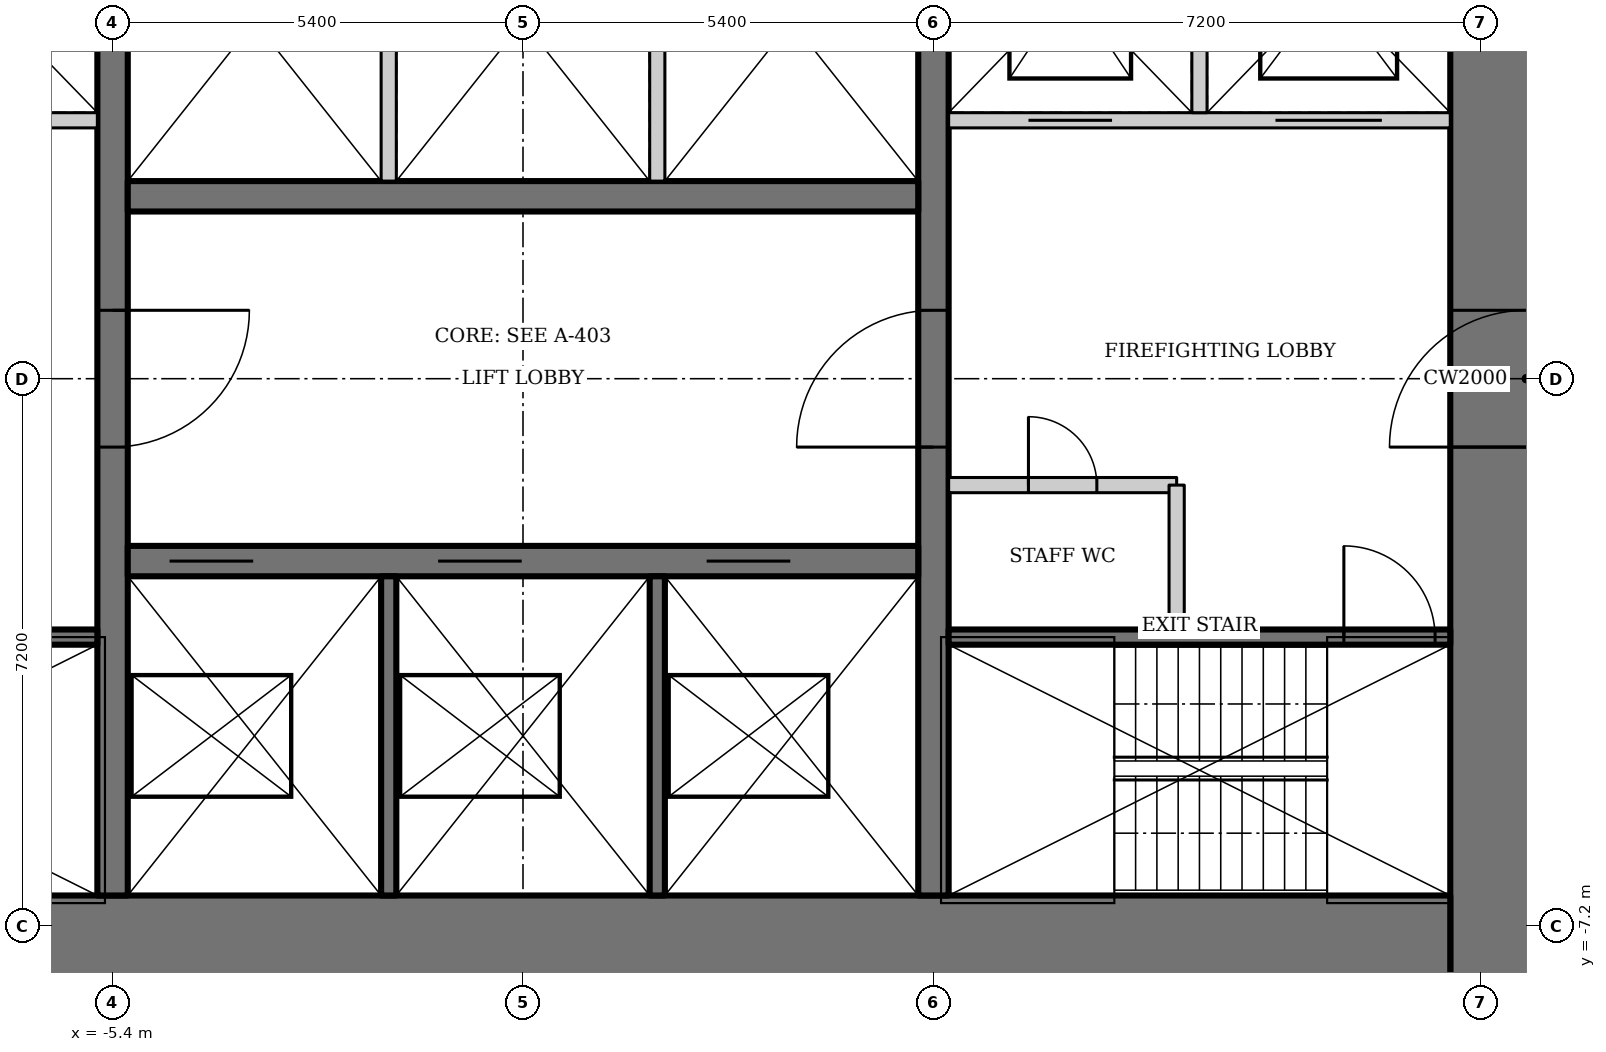
"""IFC4 building model, lengths in metres.
Left out: names, types, materials, properties, quantities, classifications, styles, units other than length and angle.
Written with IfcOpenShell. Run it as: python <this file> out.ifc"""

import sys

from ifc_helpers import new_model, si_unit, direction, frame, frame_2d, origin, place, context, subcontext, project, spatial, rectangle, extrude, element, fill, save


model = new_model("IFC4")
c1 = context("Model", 3, precision=1e-05, world=origin(), true_north=direction((0.0, 1.0)))
c2 = subcontext(c1, "Body", "Model", "MODEL_VIEW")
j1 = project(units=[si_unit("LENGTHUNIT", "METRE"), si_unit("PLANEANGLEUNIT", "RADIAN")], contexts=[c1])
p1 = place(None, origin())
s1 = spatial("IfcSite", under=j1, at=p1, CompositionType="ELEMENT")
p2 = place(p1, origin())
s2 = spatial("IfcBuilding", under=s1, at=p2, CompositionType="ELEMENT")
p3 = place(p2, frame((0.0, 0.0, 91.0)))
s3 = spatial("IfcBuildingStorey", under=s2, at=p3, CompositionType="ELEMENT", Elevation=91.0)
p4 = place(p3, frame((13.2, -13.0, 0.0), z_axis=(0.0, 0.0, 1.0), x_axis=(0.0, 1.0, 0.0)))
e1 = element("IfcWall", 1, at=p4, inside=s3, PredefinedType="SHEAR", context=c2, shape_type="SweptSolid", body=[
    extrude(rectangle(XDim=26.0, YDim=2.0, at=frame_2d((13.0, 0.0))), origin(), (0.0, 0.0, 1.0), 3.6),
])
p5 = place(p4, frame((12.1, 0.0, 0.0)))
e2 = element("IfcOpeningElement", 2, at=p5, cuts=e1, PredefinedType="OPENING", context=c2, shape_type="SweptSolid", body=[
    extrude(rectangle(XDim=1.8, YDim=2.1, at=frame_2d((0.9, 1.05))), frame((0.0, 1.01, 0.0), z_axis=(0.0, -1.0, 0.0), x_axis=(1.0, 0.0, 0.0)), (0.0, 0.0, 1.0), 2.02),
])
p6 = place(p3, frame((-12.2, -8.0, 0.0), z_axis=(0.0, 0.0, 1.0), x_axis=(1.0, 0.0, 0.0)))
e3 = element("IfcWall", 3, at=p6, inside=s3, PredefinedType="SHEAR", context=c2, shape_type="SweptSolid", body=[
    extrude(rectangle(XDim=24.4, YDim=2.4, at=frame_2d((12.2, 0.0))), origin(), (0.0, 0.0, 1.0), 3.6),
])
p7 = place(p3, frame((5.4, -6.8, 0.0), z_axis=(0.0, 0.0, 1.0), x_axis=(0.0, 1.0, 0.0)))
e4 = element("IfcWall", 4, at=p7, inside=s3, PredefinedType="SHEAR", context=c2, shape_type="SweptSolid", body=[
    extrude(rectangle(XDim=13.6, YDim=0.4, at=frame_2d((6.8, 0.0))), origin(), (0.0, 0.0, 1.0), 3.6),
])
p8 = place(p7, frame((5.9, 0.0, 0.0)))
e5 = element("IfcOpeningElement", 5, at=p8, cuts=e4, PredefinedType="OPENING", context=c2, shape_type="SweptSolid", body=[
    extrude(rectangle(XDim=1.8, YDim=2.1, at=frame_2d((0.9, 1.05))), frame((0.0, 0.21, 0.0), z_axis=(0.0, -1.0, 0.0), x_axis=(1.0, 0.0, 0.0)), (0.0, 0.0, 1.0), 0.42),
])
p9 = place(p3, frame((-5.4, 6.8, 0.0), z_axis=(0.0, 0.0, 1.0), x_axis=(0.0, -1.0, 0.0)))
e6 = element("IfcWall", 6, at=p9, inside=s3, PredefinedType="SHEAR", context=c2, shape_type="SweptSolid", body=[
    extrude(rectangle(XDim=13.6, YDim=0.4, at=frame_2d((6.8, 0.0))), origin(), (0.0, 0.0, 1.0), 3.6),
])
p10 = place(p9, frame((5.9, 0.0, 0.0)))
e7 = element("IfcOpeningElement", 7, at=p10, cuts=e6, PredefinedType="OPENING", context=c2, shape_type="SweptSolid", body=[
    extrude(rectangle(XDim=1.8, YDim=2.1, at=frame_2d((0.9, 1.05))), frame((0.0, 0.21, 0.0), z_axis=(0.0, -1.0, 0.0), x_axis=(1.0, 0.0, 0.0)), (0.0, 0.0, 1.0), 0.42),
])
p11 = place(p3, frame((-5.2, -2.4, 0.0), z_axis=(0.0, 0.0, 1.0), x_axis=(1.0, 0.0, 0.0)))
e8 = element("IfcWall", 8, at=p11, inside=s3, PredefinedType="SHEAR", context=c2, shape_type="SweptSolid", body=[
    extrude(rectangle(XDim=10.4, YDim=0.4, at=frame_2d((5.2, 0.0))), origin(), (0.0, 0.0, 1.0), 3.6),
])
p12 = place(p11, frame((0.55, 0.0, 0.0)))
e9 = element("IfcOpeningElement", 9, at=p12, cuts=e8, PredefinedType="OPENING", context=c2, shape_type="SweptSolid", body=[
    extrude(rectangle(XDim=1.1, YDim=2.2, at=frame_2d((0.55, 1.1))), frame((0.0, 0.21, 0.0), z_axis=(0.0, -1.0, 0.0), x_axis=(1.0, 0.0, 0.0)), (0.0, 0.0, 1.0), 0.42),
])
p13 = place(p11, frame((4.083, 0.0, 0.0)))
e10 = element("IfcOpeningElement", 10, at=p13, cuts=e8, PredefinedType="OPENING", context=c2, shape_type="SweptSolid", body=[
    extrude(rectangle(XDim=1.1, YDim=2.2, at=frame_2d((0.55, 1.1))), frame((0.0, 0.21, 0.0), z_axis=(0.0, -1.0, 0.0), x_axis=(1.0, 0.0, 0.0)), (0.0, 0.0, 1.0), 0.42),
])
p14 = place(p11, frame((7.617, 0.0, 0.0)))
e11 = element("IfcOpeningElement", 11, at=p14, cuts=e8, PredefinedType="OPENING", context=c2, shape_type="SweptSolid", body=[
    extrude(rectangle(XDim=1.1, YDim=2.2, at=frame_2d((0.55, 1.1))), frame((0.0, 0.21, 0.0), z_axis=(0.0, -1.0, 0.0), x_axis=(1.0, 0.0, 0.0)), (0.0, 0.0, 1.0), 0.42),
])
for number, where, z_axis, x_axis in (
    (12, (-1.767, -2.6, 0.0), (0.0, 0.0, 1.0), (0.0, -1.0, 0.0)),
    (13, (1.767, -2.6, 0.0), (0.0, 0.0, 1.0), (0.0, -1.0, 0.0)),
):
    element("IfcWall", number, at=place(p3, frame(where, z_axis=z_axis, x_axis=x_axis)), inside=s3, PredefinedType="SOLIDWALL", context=c2, shape_type="SweptSolid", body=[
        extrude(rectangle(XDim=4.2, YDim=0.2, at=frame_2d((2.1, 0.0))), origin(), (0.0, 0.0, 1.0), 3.6),
    ])
p15 = place(p3, frame((5.2, 2.4, 0.0), z_axis=(0.0, 0.0, 1.0), x_axis=(-1.0, 0.0, 0.0)))
e14 = element("IfcWall", 14, at=p15, inside=s3, PredefinedType="SHEAR", context=c2, shape_type="SweptSolid", body=[
    extrude(rectangle(XDim=10.4, YDim=0.4, at=frame_2d((5.2, 0.0))), origin(), (0.0, 0.0, 1.0), 3.6),
])
for number, where, z_axis, x_axis in (
    (15, (-1.767, 2.6, 0.0), (0.0, 0.0, 1.0), (0.0, 1.0, 0.0)),
    (16, (1.767, 2.6, 0.0), (0.0, 0.0, 1.0), (0.0, 1.0, 0.0)),
):
    element("IfcWall", number, at=place(p3, frame(where, z_axis=z_axis, x_axis=x_axis)), inside=s3, PredefinedType="SOLIDWALL", context=c2, shape_type="SweptSolid", body=[
        extrude(rectangle(XDim=4.2, YDim=0.2, at=frame_2d((2.1, 0.0))), origin(), (0.0, 0.0, 1.0), 3.6),
    ])
p16 = place(p3, frame((5.6, -3.4, 0.0), z_axis=(0.0, 0.0, 1.0), x_axis=(1.0, 0.0, 0.0)))
e17 = element("IfcWall", 17, at=p16, inside=s3, PredefinedType="SHEAR", context=c2, shape_type="SweptSolid", body=[
    extrude(rectangle(XDim=6.6, YDim=0.2, at=frame_2d((3.3, 0.0))), origin(), (0.0, 0.0, 1.0), 3.6),
])
p17 = place(p16, frame((5.2, 0.0, 0.0)))
e18 = element("IfcOpeningElement", 18, at=p17, cuts=e17, PredefinedType="OPENING", context=c2, shape_type="SweptSolid", body=[
    extrude(rectangle(XDim=1.2, YDim=2.1, at=frame_2d((0.6, 1.05))), frame((0.0, 0.11, 0.0), z_axis=(0.0, -1.0, 0.0), x_axis=(1.0, 0.0, 0.0)), (0.0, 0.0, 1.0), 0.22),
])
p18 = place(p3, frame((12.2, 3.4, 0.0), z_axis=(0.0, 0.0, 1.0), x_axis=(-1.0, 0.0, 0.0)))
e19 = element("IfcWall", 19, at=p18, inside=s3, PredefinedType="SOLIDWALL", context=c2, shape_type="SweptSolid", body=[
    extrude(rectangle(XDim=6.6, YDim=0.2, at=frame_2d((3.3, 0.0))), origin(), (0.0, 0.0, 1.0), 3.6),
])
p19 = place(p18, frame((4.45, 0.0, 0.0)))
e20 = element("IfcOpeningElement", 20, at=p19, cuts=e19, PredefinedType="OPENING", context=c2, shape_type="SweptSolid", body=[
    extrude(rectangle(XDim=1.1, YDim=2.2, at=frame_2d((0.55, 1.1))), frame((0.0, 0.11, 0.0), z_axis=(0.0, -1.0, 0.0), x_axis=(1.0, 0.0, 0.0)), (0.0, 0.0, 1.0), 0.22),
])
p20 = place(p18, frame((0.9, 0.0, 0.0)))
e21 = element("IfcOpeningElement", 21, at=p20, cuts=e19, PredefinedType="OPENING", context=c2, shape_type="SweptSolid", body=[
    extrude(rectangle(XDim=1.4, YDim=2.2, at=frame_2d((0.7, 1.1))), frame((0.0, 0.11, 0.0), z_axis=(0.0, -1.0, 0.0), x_axis=(1.0, 0.0, 0.0)), (0.0, 0.0, 1.0), 0.22),
])
p21 = place(p3, frame((8.9, 3.5, 0.0), z_axis=(0.0, 0.0, 1.0), x_axis=(0.0, 1.0, 0.0)))
e22 = element("IfcWall", 22, at=p21, inside=s3, PredefinedType="SOLIDWALL", context=c2, shape_type="SweptSolid", body=[
    extrude(rectangle(XDim=3.3, YDim=0.2, at=frame_2d((1.65, 0.0))), origin(), (0.0, 0.0, 1.0), 3.6),
])
p22 = place(p3, frame((-5.6, -3.4, 0.0), z_axis=(0.0, 0.0, 1.0), x_axis=(-1.0, 0.0, 0.0)))
e23 = element("IfcWall", 23, at=p22, inside=s3, PredefinedType="SHEAR", context=c2, shape_type="SweptSolid", body=[
    extrude(rectangle(XDim=6.6, YDim=0.2, at=frame_2d((3.3, 0.0))), origin(), (0.0, 0.0, 1.0), 3.6),
])
p23 = place(p22, frame((5.2, 0.0, 0.0)))
e24 = element("IfcOpeningElement", 24, at=p23, cuts=e23, PredefinedType="OPENING", context=c2, shape_type="SweptSolid", body=[
    extrude(rectangle(XDim=1.2, YDim=2.1, at=frame_2d((0.6, 1.05))), frame((0.0, 0.11, 0.0), z_axis=(0.0, -1.0, 0.0), x_axis=(1.0, 0.0, 0.0)), (0.0, 0.0, 1.0), 0.22),
])
p24 = place(p3, frame((-12.2, 3.4, 0.0), z_axis=(0.0, 0.0, 1.0), x_axis=(1.0, 0.0, 0.0)))
e25 = element("IfcWall", 25, at=p24, inside=s3, PredefinedType="SOLIDWALL", context=c2, shape_type="SweptSolid", body=[
    extrude(rectangle(XDim=6.6, YDim=0.2, at=frame_2d((3.3, 0.0))), origin(), (0.0, 0.0, 1.0), 3.6),
])
p25 = place(p24, frame((1.05, 0.0, 0.0)))
e26 = element("IfcOpeningElement", 26, at=p25, cuts=e25, PredefinedType="OPENING", context=c2, shape_type="SweptSolid", body=[
    extrude(rectangle(XDim=1.1, YDim=2.2, at=frame_2d((0.55, 1.1))), frame((0.0, 0.11, 0.0), z_axis=(0.0, -1.0, 0.0), x_axis=(1.0, 0.0, 0.0)), (0.0, 0.0, 1.0), 0.22),
])
p26 = place(p24, frame((4.3, 0.0, 0.0)))
e27 = element("IfcOpeningElement", 27, at=p26, cuts=e25, PredefinedType="OPENING", context=c2, shape_type="SweptSolid", body=[
    extrude(rectangle(XDim=1.4, YDim=2.2, at=frame_2d((0.7, 1.1))), frame((0.0, 0.11, 0.0), z_axis=(0.0, -1.0, 0.0), x_axis=(1.0, 0.0, 0.0)), (0.0, 0.0, 1.0), 0.22),
])
p27 = place(p3, frame((5.6, -1.4, 0.0), z_axis=(0.0, 0.0, 1.0), x_axis=(1.0, 0.0, 0.0)))
e28 = element("IfcWall", 28, at=p27, inside=s3, PredefinedType="SOLIDWALL", context=c2, shape_type="SweptSolid", body=[
    extrude(rectangle(XDim=3.0, YDim=0.2, at=frame_2d((1.5, 0.0))), origin(), (0.0, 0.0, 1.0), 3.45),
])
p28 = place(p27, frame((1.05, 0.0, 0.0)))
e29 = element("IfcOpeningElement", 29, at=p28, cuts=e28, PredefinedType="OPENING", context=c2, shape_type="SweptSolid", body=[
    extrude(rectangle(XDim=0.9, YDim=2.1, at=frame_2d((0.45, 1.05))), frame((0.0, 0.11, 0.0), z_axis=(0.0, -1.0, 0.0), x_axis=(1.0, 0.0, 0.0)), (0.0, 0.0, 1.0), 0.22),
])
p29 = place(p3, frame((8.6, -1.4, 0.0), z_axis=(0.0, 0.0, 1.0), x_axis=(0.0, -1.0, 0.0)))
e30 = element("IfcWall", 30, at=p29, inside=s3, PredefinedType="SOLIDWALL", context=c2, shape_type="SweptSolid", body=[
    extrude(rectangle(XDim=1.9, YDim=0.2, at=frame_2d((0.95, 0.0))), origin(), (0.0, 0.0, 1.0), 3.45),
])
p30 = place(p28, origin())
e31 = element("IfcDoor", 31, at=p30, inside=s3, OperationType="SINGLE_SWING_LEFT", PredefinedType="DOOR", context=c2, shape_type="SweptSolid", body=[
    extrude(rectangle(XDim=0.9, YDim=2.1, at=frame_2d((0.45, 1.05))), frame((0.0, 0.025, 0.0), z_axis=(0.0, -1.0, 0.0), x_axis=(1.0, 0.0, 0.0)), (0.0, 0.0, 1.0), 0.05),
])
fill(e29, e31)
p31 = place(p8, origin())
e32 = element("IfcDoor", 32, at=p31, inside=s3, OperationType="DOUBLE_DOOR_DOUBLE_SWING", PredefinedType="DOOR", context=c2, shape_type="SweptSolid", body=[
    extrude(rectangle(XDim=1.8, YDim=2.1, at=frame_2d((0.9, 1.05))), frame((0.0, 0.025, 0.0), z_axis=(0.0, -1.0, 0.0), x_axis=(1.0, 0.0, 0.0)), (0.0, 0.0, 1.0), 0.05),
])
fill(e5, e32)
p32 = place(p10, origin())
e33 = element("IfcDoor", 33, at=p32, inside=s3, OperationType="DOUBLE_DOOR_DOUBLE_SWING", PredefinedType="DOOR", context=c2, shape_type="SweptSolid", body=[
    extrude(rectangle(XDim=1.8, YDim=2.1, at=frame_2d((0.9, 1.05))), frame((0.0, 0.025, 0.0), z_axis=(0.0, -1.0, 0.0), x_axis=(1.0, 0.0, 0.0)), (0.0, 0.0, 1.0), 0.05),
])
fill(e7, e33)
p33 = place(p17, origin())
e34 = element("IfcDoor", 34, at=p33, inside=s3, OperationType="SINGLE_SWING_RIGHT", PredefinedType="DOOR", context=c2, shape_type="SweptSolid", body=[
    extrude(rectangle(XDim=1.2, YDim=2.1, at=frame_2d((0.6, 1.05))), frame((0.0, 0.025, 0.0), z_axis=(0.0, -1.0, 0.0), x_axis=(1.0, 0.0, 0.0)), (0.0, 0.0, 1.0), 0.05),
])
fill(e18, e34)
p34 = place(p5, origin())
e35 = element("IfcDoor", 35, at=p34, inside=s3, OperationType="DOUBLE_DOOR_DOUBLE_SWING", PredefinedType="DOOR", context=c2, shape_type="SweptSolid", body=[
    extrude(rectangle(XDim=1.8, YDim=2.1, at=frame_2d((0.9, 1.05))), frame((0.0, 0.025, 0.0), z_axis=(0.0, -1.0, 0.0), x_axis=(1.0, 0.0, 0.0)), (0.0, 0.0, 1.0), 0.05),
])
fill(e2, e35)
p35 = place(p12, origin())
e36 = element("IfcDoor", 36, at=p35, inside=s3, OperationType="DOUBLE_DOOR_SLIDING", PredefinedType="DOOR", context=c2, shape_type="SweptSolid", body=[
    extrude(rectangle(XDim=1.1, YDim=2.2, at=frame_2d((0.55, 1.1))), frame((0.0, 0.025, 0.0), z_axis=(0.0, -1.0, 0.0), x_axis=(1.0, 0.0, 0.0)), (0.0, 0.0, 1.0), 0.05),
])
fill(e9, e36)
p36 = place(p13, origin())
e37 = element("IfcDoor", 37, at=p36, inside=s3, OperationType="DOUBLE_DOOR_SLIDING", PredefinedType="DOOR", context=c2, shape_type="SweptSolid", body=[
    extrude(rectangle(XDim=1.1, YDim=2.2, at=frame_2d((0.55, 1.1))), frame((0.0, 0.025, 0.0), z_axis=(0.0, -1.0, 0.0), x_axis=(1.0, 0.0, 0.0)), (0.0, 0.0, 1.0), 0.05),
])
fill(e10, e37)
p37 = place(p14, origin())
e38 = element("IfcDoor", 38, at=p37, inside=s3, OperationType="DOUBLE_DOOR_SLIDING", PredefinedType="DOOR", context=c2, shape_type="SweptSolid", body=[
    extrude(rectangle(XDim=1.1, YDim=2.2, at=frame_2d((0.55, 1.1))), frame((0.0, 0.025, 0.0), z_axis=(0.0, -1.0, 0.0), x_axis=(1.0, 0.0, 0.0)), (0.0, 0.0, 1.0), 0.05),
])
fill(e11, e38)
p38 = place(p19, origin())
e39 = element("IfcDoor", 39, at=p38, inside=s3, OperationType="DOUBLE_DOOR_SLIDING", PredefinedType="DOOR", context=c2, shape_type="SweptSolid", body=[
    extrude(rectangle(XDim=1.1, YDim=2.2, at=frame_2d((0.55, 1.1))), frame((0.0, 0.025, 0.0), z_axis=(0.0, -1.0, 0.0), x_axis=(1.0, 0.0, 0.0)), (0.0, 0.0, 1.0), 0.05),
])
fill(e20, e39)
p39 = place(p20, origin())
e40 = element("IfcDoor", 40, at=p39, inside=s3, OperationType="DOUBLE_DOOR_SLIDING", PredefinedType="DOOR", context=c2, shape_type="SweptSolid", body=[
    extrude(rectangle(XDim=1.4, YDim=2.2, at=frame_2d((0.7, 1.1))), frame((0.0, 0.025, 0.0), z_axis=(0.0, -1.0, 0.0), x_axis=(1.0, 0.0, 0.0)), (0.0, 0.0, 1.0), 0.05),
])
fill(e21, e40)
save(model, sys.argv[1])
